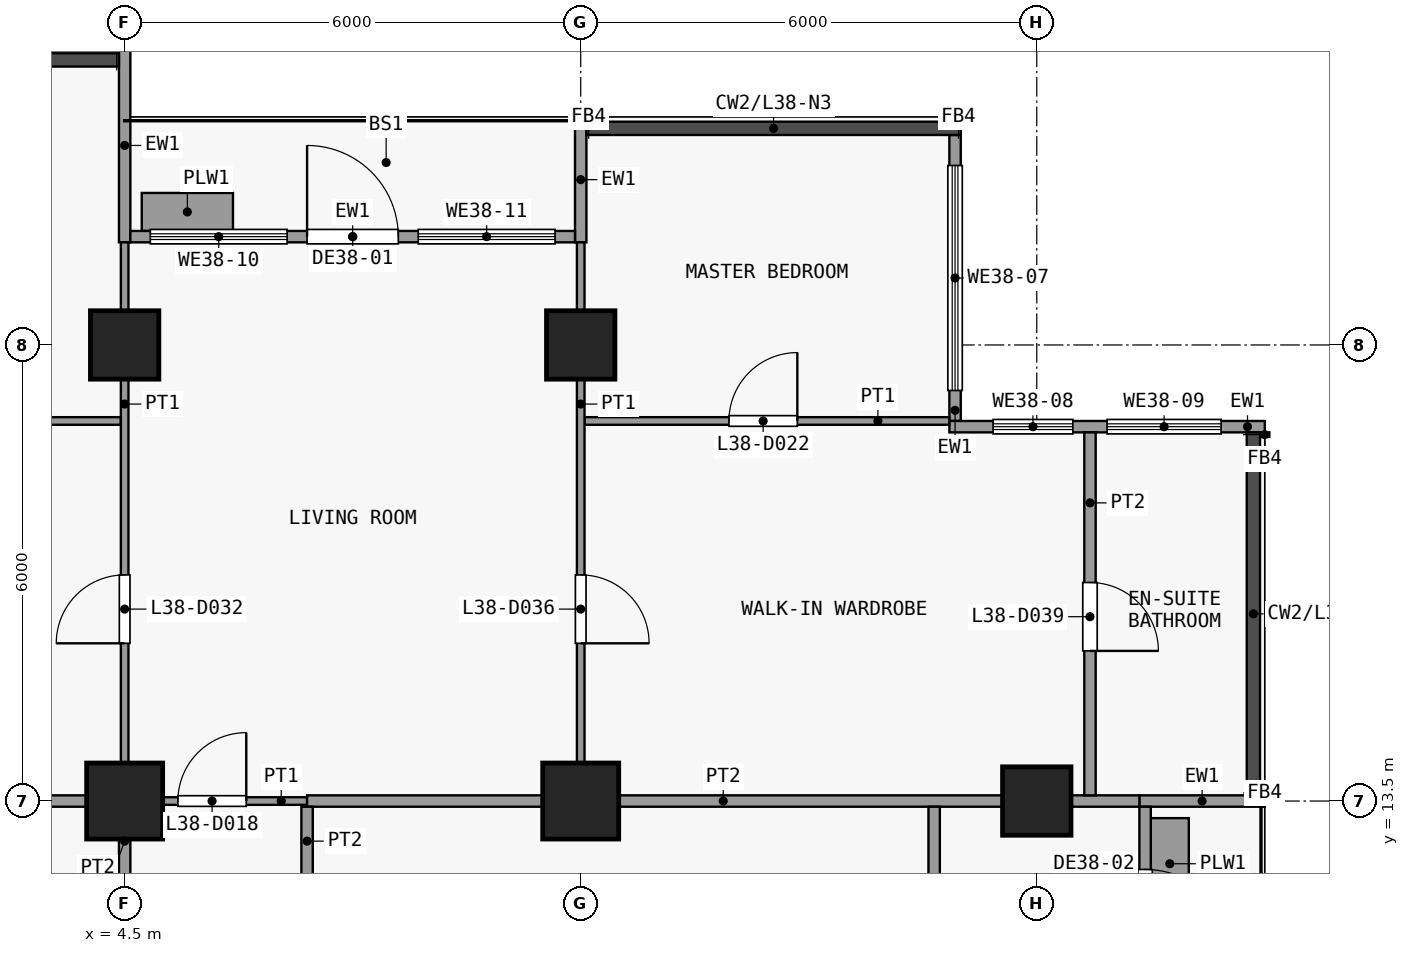
"""IFC4 building model, lengths in metres.
Left out: names, types, materials, properties, quantities, classifications, styles, units other than length and angle.
Written with IfcOpenShell. Run it as: python <this file> out.ifc"""

import sys

from ifc_helpers import new_model, si_unit, direction, frame, frame_2d, origin, origin_2d, place, context, subcontext, project, spatial, rectangle, extrude, element, fill, save


model = new_model("IFC4")
c1 = context("Model", 3, precision=1e-05, world=origin(), true_north=direction((0.0, 1.0)))
c2 = subcontext(c1, "Body", "Model", "MODEL_VIEW")
j1 = project(units=[si_unit("LENGTHUNIT", "METRE"), si_unit("PLANEANGLEUNIT", "RADIAN")], contexts=[c1])
p1 = place(None, origin())
s1 = spatial("IfcSite", under=j1, at=p1, CompositionType="ELEMENT")
p2 = place(p1, origin())
s2 = spatial("IfcBuilding", under=s1, at=p2, CompositionType="ELEMENT")
p3 = place(p2, frame((0.0, 0.0, 156.5)))
s3 = spatial("IfcBuildingStorey", under=s2, at=p3, CompositionType="ELEMENT", Elevation=156.5)
p4 = place(p3, frame((4.5, 13.5, 0.0), z_axis=(0.0, 0.0, 1.0), x_axis=(1.0, 0.0, 0.0)))
e1 = element("IfcColumn", 1, at=p4, inside=s3, PredefinedType="COLUMN", context=c2, shape_type="SweptSolid", body=[
    extrude(rectangle(XDim=1.0, YDim=1.0, at=origin_2d()), origin(), (0.0, 0.0, 1.0), 3.6),
])
p5 = place(p3, frame((4.5, 19.5, 0.0), z_axis=(0.0, 0.0, 1.0), x_axis=(1.0, 0.0, 0.0)))
e2 = element("IfcColumn", 2, at=p5, inside=s3, PredefinedType="COLUMN", context=c2, shape_type="SweptSolid", body=[
    extrude(rectangle(XDim=0.9, YDim=0.9, at=origin_2d()), origin(), (0.0, 0.0, 1.0), 3.6),
])
p6 = place(p3, frame((10.5, 13.5, 0.0), z_axis=(0.0, 0.0, 1.0), x_axis=(1.0, 0.0, 0.0)))
e3 = element("IfcColumn", 3, at=p6, inside=s3, PredefinedType="COLUMN", context=c2, shape_type="SweptSolid", body=[
    extrude(rectangle(XDim=1.0, YDim=1.0, at=origin_2d()), origin(), (0.0, 0.0, 1.0), 3.6),
])
for number, where, z_axis, x_axis in (
    (4, (10.5, 19.5, 0.0), (0.0, 0.0, 1.0), (1.0, 0.0, 0.0)),
    (5, (16.5, 13.5, 0.0), (0.0, 0.0, 1.0), (1.0, 0.0, 0.0)),
):
    element("IfcColumn", number, at=place(p3, frame(where, z_axis=z_axis, x_axis=x_axis)), inside=s3, PredefinedType="COLUMN", context=c2, shape_type="SweptSolid", body=[
        extrude(rectangle(XDim=0.9, YDim=0.9, at=origin_2d()), origin(), (0.0, 0.0, 1.0), 3.6),
    ])
p7 = place(p3, frame((15.425, 22.262, 0.0), z_axis=(0.0, 0.0, 1.0), x_axis=(0.0, -1.0, 0.0)))
e6 = element("IfcWall", 6, at=p7, inside=s3, PredefinedType="SOLIDWALL", context=c2, shape_type="SweptSolid", body=[
    extrude(rectangle(XDim=3.762, YDim=0.15, at=frame_2d((1.881, 0.0))), origin(), (0.0, 0.0, 1.0), 3.3),
])
p8 = place(p7, frame((0.401, 0.0, 0.9)))
e7 = element("IfcOpeningElement", 7, at=p8, cuts=e6, PredefinedType="OPENING", context=c2, shape_type="SweptSolid", body=[
    extrude(rectangle(XDim=2.96, YDim=2.4, at=frame_2d((1.48, 1.2))), frame((0.0, 0.085, 0.0), z_axis=(0.0, -1.0, 0.0), x_axis=(1.0, 0.0, 0.0)), (0.0, 0.0, 1.0), 0.17),
])
p9 = place(p3, frame((15.35, 18.425, 0.0), z_axis=(0.0, 0.0, 1.0), x_axis=(1.0, 0.0, 0.0)))
e8 = element("IfcWall", 8, at=p9, inside=s3, PredefinedType="SOLIDWALL", context=c2, shape_type="SweptSolid", body=[
    extrude(rectangle(XDim=4.15, YDim=0.15, at=frame_2d((2.075, 0.0))), origin(), (0.0, 0.0, 1.0), 3.3),
])
p10 = place(p9, frame((0.575, 0.0, 0.9)))
e9 = element("IfcOpeningElement", 9, at=p10, cuts=e8, PredefinedType="OPENING", context=c2, shape_type="SweptSolid", body=[
    extrude(rectangle(XDim=1.05, YDim=2.4, at=frame_2d((0.525, 1.2))), frame((0.0, 0.085, 0.0), z_axis=(0.0, -1.0, 0.0), x_axis=(1.0, 0.0, 0.0)), (0.0, 0.0, 1.0), 0.17),
])
p11 = place(p9, frame((2.075, 0.0, 0.9)))
e10 = element("IfcOpeningElement", 10, at=p11, cuts=e8, PredefinedType="OPENING", context=c2, shape_type="SweptSolid", body=[
    extrude(rectangle(XDim=1.5, YDim=2.4, at=frame_2d((0.75, 1.2))), frame((0.0, 0.085, 0.0), z_axis=(0.0, -1.0, 0.0), x_axis=(1.0, 0.0, 0.0)), (0.0, 0.0, 1.0), 0.17),
])
p12 = place(p3, frame((4.5, 20.85, 0.0), z_axis=(0.0, 0.0, 1.0), x_axis=(0.0, 1.0, 0.0)))
e11 = element("IfcWall", 11, at=p12, inside=s3, PredefinedType="SOLIDWALL", context=c2, shape_type="SweptSolid", body=[
    extrude(rectangle(XDim=2.55, YDim=0.15, at=frame_2d((1.275, 0.0))), origin(), (0.0, 0.0, 1.0), 3.3),
])
p13 = place(p3, frame((10.5, 20.85, 0.0), z_axis=(0.0, 0.0, 1.0), x_axis=(0.0, 1.0, 0.0)))
e12 = element("IfcWall", 12, at=p13, inside=s3, PredefinedType="SOLIDWALL", context=c2, shape_type="SweptSolid", body=[
    extrude(rectangle(XDim=1.65, YDim=0.15, at=frame_2d((0.825, 0.0))), origin(), (0.0, 0.0, 1.0), 3.3),
])
p14 = place(p3, frame((4.575, 20.925, 0.0), z_axis=(0.0, 0.0, 1.0), x_axis=(1.0, 0.0, 0.0)))
e13 = element("IfcWall", 13, at=p14, inside=s3, PredefinedType="SOLIDWALL", context=c2, shape_type="SweptSolid", body=[
    extrude(rectangle(XDim=5.85, YDim=0.15, at=frame_2d((2.925, 0.0))), origin(), (0.0, 0.0, 1.0), 3.3),
])
p15 = place(p14, frame((2.325, 0.0, 0.0)))
e14 = element("IfcOpeningElement", 14, at=p15, cuts=e13, PredefinedType="OPENING", context=c2, shape_type="SweptSolid", body=[
    extrude(rectangle(XDim=1.2, YDim=2.4, at=frame_2d((0.6, 1.2))), frame((0.0, 0.085, 0.0), z_axis=(0.0, -1.0, 0.0), x_axis=(1.0, 0.0, 0.0)), (0.0, 0.0, 1.0), 0.17),
])
p16 = place(p14, frame((0.262, 0.0, 0.9)))
e15 = element("IfcOpeningElement", 15, at=p16, cuts=e13, PredefinedType="OPENING", context=c2, shape_type="SweptSolid", body=[
    extrude(rectangle(XDim=1.8, YDim=2.1, at=frame_2d((0.9, 1.05))), frame((0.0, 0.085, 0.0), z_axis=(0.0, -1.0, 0.0), x_axis=(1.0, 0.0, 0.0)), (0.0, 0.0, 1.0), 0.17),
])
p17 = place(p14, frame((3.788, 0.0, 0.9)))
e16 = element("IfcOpeningElement", 16, at=p17, cuts=e13, PredefinedType="OPENING", context=c2, shape_type="SweptSolid", body=[
    extrude(rectangle(XDim=1.8, YDim=2.1, at=frame_2d((0.9, 1.05))), frame((0.0, 0.085, 0.0), z_axis=(0.0, -1.0, 0.0), x_axis=(1.0, 0.0, 0.0)), (0.0, 0.0, 1.0), 0.17),
])
p18 = place(p3, frame((4.725, 21.25, 0.0), z_axis=(0.0, 0.0, 1.0), x_axis=(1.0, 0.0, 0.0)))
e17 = element("IfcWall", 17, at=p18, inside=s3, PredefinedType="USERDEFINED", context=c2, shape_type="SweptSolid", body=[
    extrude(rectangle(XDim=1.2, YDim=0.5, at=frame_2d((0.6, 0.0))), origin(), (0.0, 0.0, 1.0), 0.9),
])
p19 = place(p3, frame((17.85, 13.5, 0.0), z_axis=(0.0, 0.0, 1.0), x_axis=(1.0, 0.0, 0.0)))
e18 = element("IfcWall", 18, at=p19, inside=s3, PredefinedType="SOLIDWALL", context=c2, shape_type="SweptSolid", body=[
    extrude(rectangle(XDim=1.65, YDim=0.15, at=frame_2d((0.825, 0.0))), origin(), (0.0, 0.0, 1.0), 3.3),
])
p20 = place(p3, frame((17.925, 13.425, 0.0), z_axis=(0.0, 0.0, 1.0), x_axis=(0.0, -1.0, 0.0)))
e19 = element("IfcWall", 19, at=p20, inside=s3, PredefinedType="SOLIDWALL", context=c2, shape_type="SweptSolid", body=[
    extrude(rectangle(XDim=5.85, YDim=0.15, at=frame_2d((2.925, 0.0))), origin(), (0.0, 0.0, 1.0), 3.3),
])
p21 = place(p20, frame((0.825, 0.0, 0.0)))
e20 = element("IfcOpeningElement", 20, at=p21, cuts=e19, PredefinedType="OPENING", context=c2, shape_type="SweptSolid", body=[
    extrude(rectangle(XDim=1.2, YDim=2.4, at=frame_2d((0.6, 1.2))), frame((0.0, 0.085, 0.0), z_axis=(0.0, -1.0, 0.0), x_axis=(1.0, 0.0, 0.0)), (0.0, 0.0, 1.0), 0.17),
])
p22 = place(p20, frame((3.038, 0.0, 0.9)))
e21 = element("IfcOpeningElement", 21, at=p22, cuts=e19, PredefinedType="OPENING", context=c2, shape_type="SweptSolid", body=[
    extrude(rectangle(XDim=1.8, YDim=2.1, at=frame_2d((0.9, 1.05))), frame((0.0, 0.085, 0.0), z_axis=(0.0, -1.0, 0.0), x_axis=(1.0, 0.0, 0.0)), (0.0, 0.0, 1.0), 0.17),
])
p23 = place(p3, frame((18.25, 12.075, 0.0), z_axis=(0.0, 0.0, 1.0), x_axis=(0.0, 1.0, 0.0)))
e22 = element("IfcWall", 22, at=p23, inside=s3, PredefinedType="USERDEFINED", context=c2, shape_type="SweptSolid", body=[
    extrude(rectangle(XDim=1.2, YDim=0.5, at=frame_2d((0.6, 0.0))), origin(), (0.0, 0.0, 1.0), 0.9),
])
p24 = place(p3, frame((4.5, 13.5, 0.0), z_axis=(0.0, 0.0, 1.0), x_axis=(1.0, 0.0, 0.0)))
e23 = element("IfcWall", 23, at=p24, inside=s3, PredefinedType="PARTITIONING", context=c2, shape_type="SweptSolid", body=[
    extrude(rectangle(XDim=2.4, YDim=0.1, at=frame_2d((1.2, 0.0))), origin(), (0.0, 0.0, 1.0), 3.3),
])
p25 = place(p24, frame((0.7, 0.0, 0.0)))
e24 = element("IfcOpeningElement", 24, at=p25, cuts=e23, PredefinedType="OPENING", context=c2, shape_type="SweptSolid", body=[
    extrude(rectangle(XDim=0.9, YDim=2.1, at=frame_2d((0.45, 1.05))), frame((0.0, 0.06, 0.0), z_axis=(0.0, -1.0, 0.0), x_axis=(1.0, 0.0, 0.0)), (0.0, 0.0, 1.0), 0.12),
])
p26 = place(p3, frame((0.0, 13.5, 0.0), z_axis=(0.0, 0.0, 1.0), x_axis=(1.0, 0.0, 0.0)))
e25 = element("IfcWall", 25, at=p26, inside=s3, PredefinedType="PARTITIONING", context=c2, shape_type="SweptSolid", body=[
    extrude(rectangle(XDim=4.5, YDim=0.15, at=frame_2d((2.25, 0.0))), origin(), (0.0, 0.0, 1.0), 3.3),
])
p27 = place(p3, frame((6.9, 13.5, 0.0), z_axis=(0.0, 0.0, 1.0), x_axis=(1.0, 0.0, 0.0)))
e26 = element("IfcWall", 26, at=p27, inside=s3, PredefinedType="PARTITIONING", context=c2, shape_type="SweptSolid", body=[
    extrude(rectangle(XDim=10.95, YDim=0.15, at=frame_2d((5.475, 0.0))), origin(), (0.0, 0.0, 1.0), 3.3),
])
p28 = place(p3, frame((-4.4, 18.5, 0.0), z_axis=(0.0, 0.0, 1.0), x_axis=(1.0, 0.0, 0.0)))
e27 = element("IfcWall", 27, at=p28, inside=s3, PredefinedType="PARTITIONING", context=c2, shape_type="SweptSolid", body=[
    extrude(rectangle(XDim=8.85, YDim=0.1, at=frame_2d((4.425, 0.0))), origin(), (0.0, 0.0, 1.0), 3.3),
])
p29 = place(p28, frame((4.0, 0.0, 0.0)))
e28 = element("IfcOpeningElement", 28, at=p29, cuts=e27, PredefinedType="OPENING", context=c2, shape_type="SweptSolid", body=[
    extrude(rectangle(XDim=0.9, YDim=2.1, at=frame_2d((0.45, 1.05))), frame((0.0, 0.06, 0.0), z_axis=(0.0, -1.0, 0.0), x_axis=(1.0, 0.0, 0.0)), (0.0, 0.0, 1.0), 0.12),
])
p30 = place(p3, frame((10.55, 18.5, 0.0), z_axis=(0.0, 0.0, 1.0), x_axis=(1.0, 0.0, 0.0)))
e29 = element("IfcWall", 29, at=p30, inside=s3, PredefinedType="PARTITIONING", context=c2, shape_type="SweptSolid", body=[
    extrude(rectangle(XDim=4.8, YDim=0.1, at=frame_2d((2.4, 0.0))), origin(), (0.0, 0.0, 1.0), 3.3),
])
p31 = place(p30, frame((1.9, 0.0, 0.0)))
e30 = element("IfcOpeningElement", 30, at=p31, cuts=e29, PredefinedType="OPENING", context=c2, shape_type="SweptSolid", body=[
    extrude(rectangle(XDim=0.9, YDim=2.1, at=frame_2d((0.45, 1.05))), frame((0.0, 0.06, 0.0), z_axis=(0.0, -1.0, 0.0), x_axis=(1.0, 0.0, 0.0)), (0.0, 0.0, 1.0), 0.12),
])
p32 = place(p3, frame((4.5, 13.575, 0.0), z_axis=(0.0, 0.0, 1.0), x_axis=(0.0, 1.0, 0.0)))
e31 = element("IfcWall", 31, at=p32, inside=s3, PredefinedType="PARTITIONING", context=c2, shape_type="SweptSolid", body=[
    extrude(rectangle(XDim=7.275, YDim=0.1, at=frame_2d((3.638, 0.0))), origin(), (0.0, 0.0, 1.0), 3.3),
])
p33 = place(p32, frame((2.0, 0.0, 0.0)))
e32 = element("IfcOpeningElement", 32, at=p33, cuts=e31, PredefinedType="OPENING", context=c2, shape_type="SweptSolid", body=[
    extrude(rectangle(XDim=0.9, YDim=2.1, at=frame_2d((0.45, 1.05))), frame((0.0, 0.06, 0.0), z_axis=(0.0, -1.0, 0.0), x_axis=(1.0, 0.0, 0.0)), (0.0, 0.0, 1.0), 0.12),
])
p34 = place(p3, frame((4.5, 10.6, 0.0), z_axis=(0.0, 0.0, 1.0), x_axis=(0.0, 1.0, 0.0)))
e33 = element("IfcWall", 33, at=p34, inside=s3, PredefinedType="PARTITIONING", context=c2, shape_type="SweptSolid", body=[
    extrude(rectangle(XDim=2.825, YDim=0.15, at=frame_2d((1.413, 0.0))), origin(), (0.0, 0.0, 1.0), 3.3),
])
p35 = place(p34, frame((0.9, 0.0, 0.0)))
e34 = element("IfcOpeningElement", 34, at=p35, cuts=e33, PredefinedType="OPENING", context=c2, shape_type="SweptSolid", body=[
    extrude(rectangle(XDim=0.9, YDim=2.1, at=frame_2d((0.45, 1.05))), frame((0.0, 0.085, 0.0), z_axis=(0.0, -1.0, 0.0), x_axis=(1.0, 0.0, 0.0)), (0.0, 0.0, 1.0), 0.17),
])
p36 = place(p3, frame((6.9, 10.6, 0.0), z_axis=(0.0, 0.0, 1.0), x_axis=(0.0, 1.0, 0.0)))
e35 = element("IfcWall", 35, at=p36, inside=s3, PredefinedType="PARTITIONING", context=c2, shape_type="SweptSolid", body=[
    extrude(rectangle(XDim=2.825, YDim=0.15, at=frame_2d((1.413, 0.0))), origin(), (0.0, 0.0, 1.0), 3.3),
])
p37 = place(p36, frame((0.9, 0.0, 0.0)))
e36 = element("IfcOpeningElement", 36, at=p37, cuts=e35, PredefinedType="OPENING", context=c2, shape_type="SweptSolid", body=[
    extrude(rectangle(XDim=0.9, YDim=2.1, at=frame_2d((0.45, 1.05))), frame((0.0, 0.085, 0.0), z_axis=(0.0, -1.0, 0.0), x_axis=(1.0, 0.0, 0.0)), (0.0, 0.0, 1.0), 0.17),
])
p38 = place(p3, frame((10.5, 13.575, 0.0), z_axis=(0.0, 0.0, 1.0), x_axis=(0.0, 1.0, 0.0)))
e37 = element("IfcWall", 37, at=p38, inside=s3, PredefinedType="PARTITIONING", context=c2, shape_type="SweptSolid", body=[
    extrude(rectangle(XDim=7.275, YDim=0.1, at=frame_2d((3.638, 0.0))), origin(), (0.0, 0.0, 1.0), 3.3),
])
p39 = place(p38, frame((2.0, 0.0, 0.0)))
e38 = element("IfcOpeningElement", 38, at=p39, cuts=e37, PredefinedType="OPENING", context=c2, shape_type="SweptSolid", body=[
    extrude(rectangle(XDim=0.9, YDim=2.1, at=frame_2d((0.45, 1.05))), frame((0.0, 0.06, 0.0), z_axis=(0.0, -1.0, 0.0), x_axis=(1.0, 0.0, 0.0)), (0.0, 0.0, 1.0), 0.12),
])
p40 = place(p3, frame((15.15, 10.6, 0.0), z_axis=(0.0, 0.0, 1.0), x_axis=(0.0, 1.0, 0.0)))
e39 = element("IfcWall", 39, at=p40, inside=s3, PredefinedType="PARTITIONING", context=c2, shape_type="SweptSolid", body=[
    extrude(rectangle(XDim=2.825, YDim=0.15, at=frame_2d((1.413, 0.0))), origin(), (0.0, 0.0, 1.0), 3.3),
])
p41 = place(p40, frame((1.0, 0.0, 0.0)))
e40 = element("IfcOpeningElement", 40, at=p41, cuts=e39, PredefinedType="OPENING", context=c2, shape_type="SweptSolid", body=[
    extrude(rectangle(XDim=0.9, YDim=2.1, at=frame_2d((0.45, 1.05))), frame((0.0, 0.085, 0.0), z_axis=(0.0, -1.0, 0.0), x_axis=(1.0, 0.0, 0.0)), (0.0, 0.0, 1.0), 0.17),
])
p42 = place(p3, frame((17.2, 13.575, 0.0), z_axis=(0.0, 0.0, 1.0), x_axis=(0.0, 1.0, 0.0)))
e41 = element("IfcWall", 41, at=p42, inside=s3, PredefinedType="PARTITIONING", context=c2, shape_type="SweptSolid", body=[
    extrude(rectangle(XDim=4.775, YDim=0.15, at=frame_2d((2.388, 0.0))), origin(), (0.0, 0.0, 1.0), 3.3),
])
p43 = place(p42, frame((1.9, 0.0, 0.0)))
e42 = element("IfcOpeningElement", 42, at=p43, cuts=e41, PredefinedType="OPENING", context=c2, shape_type="SweptSolid", body=[
    extrude(rectangle(XDim=0.9, YDim=2.1, at=frame_2d((0.45, 1.05))), frame((0.0, 0.085, 0.0), z_axis=(0.0, -1.0, 0.0), x_axis=(1.0, 0.0, 0.0)), (0.0, 0.0, 1.0), 0.17),
])
p44 = place(p8, origin())
e43 = element("IfcWindow", 43, at=p44, inside=s3, PartitioningType="SINGLE_PANEL", PredefinedType="WINDOW", context=c2, shape_type="SweptSolid", body=[
    extrude(rectangle(XDim=2.96, YDim=2.4, at=frame_2d((1.48, 1.2))), frame((0.0, 0.03, 0.0), z_axis=(0.0, -1.0, 0.0), x_axis=(1.0, 0.0, 0.0)), (0.0, 0.0, 1.0), 0.06),
])
fill(e7, e43)
p45 = place(p10, origin())
e44 = element("IfcWindow", 44, at=p45, inside=s3, PartitioningType="SINGLE_PANEL", PredefinedType="WINDOW", context=c2, shape_type="SweptSolid", body=[
    extrude(rectangle(XDim=1.05, YDim=2.4, at=frame_2d((0.525, 1.2))), frame((0.0, 0.03, 0.0), z_axis=(0.0, -1.0, 0.0), x_axis=(1.0, 0.0, 0.0)), (0.0, 0.0, 1.0), 0.06),
])
fill(e9, e44)
p46 = place(p11, origin())
e45 = element("IfcWindow", 45, at=p46, inside=s3, PartitioningType="SINGLE_PANEL", PredefinedType="WINDOW", context=c2, shape_type="SweptSolid", body=[
    extrude(rectangle(XDim=1.5, YDim=2.4, at=frame_2d((0.75, 1.2))), frame((0.0, 0.03, 0.0), z_axis=(0.0, -1.0, 0.0), x_axis=(1.0, 0.0, 0.0)), (0.0, 0.0, 1.0), 0.06),
])
fill(e10, e45)
p47 = place(p15, origin())
e46 = element("IfcDoor", 46, at=p47, inside=s3, OperationType="SINGLE_SWING_LEFT", PredefinedType="DOOR", context=c2, shape_type="SweptSolid", body=[
    extrude(rectangle(XDim=1.2, YDim=2.4, at=frame_2d((0.6, 1.2))), frame((0.0, 0.025, 0.0), z_axis=(0.0, -1.0, 0.0), x_axis=(1.0, 0.0, 0.0)), (0.0, 0.0, 1.0), 0.05),
])
fill(e14, e46)
p48 = place(p16, origin())
e47 = element("IfcWindow", 47, at=p48, inside=s3, PartitioningType="SINGLE_PANEL", PredefinedType="WINDOW", context=c2, shape_type="SweptSolid", body=[
    extrude(rectangle(XDim=1.8, YDim=2.1, at=frame_2d((0.9, 1.05))), frame((0.0, 0.03, 0.0), z_axis=(0.0, -1.0, 0.0), x_axis=(1.0, 0.0, 0.0)), (0.0, 0.0, 1.0), 0.06),
])
fill(e15, e47)
p49 = place(p17, origin())
e48 = element("IfcWindow", 48, at=p49, inside=s3, PartitioningType="SINGLE_PANEL", PredefinedType="WINDOW", context=c2, shape_type="SweptSolid", body=[
    extrude(rectangle(XDim=1.8, YDim=2.1, at=frame_2d((0.9, 1.05))), frame((0.0, 0.03, 0.0), z_axis=(0.0, -1.0, 0.0), x_axis=(1.0, 0.0, 0.0)), (0.0, 0.0, 1.0), 0.06),
])
fill(e16, e48)
p50 = place(p21, origin())
e49 = element("IfcDoor", 49, at=p50, inside=s3, OperationType="SINGLE_SWING_RIGHT", PredefinedType="DOOR", context=c2, shape_type="SweptSolid", body=[
    extrude(rectangle(XDim=1.2, YDim=2.4, at=frame_2d((0.6, 1.2))), frame((0.0, 0.025, 0.0), z_axis=(0.0, -1.0, 0.0), x_axis=(1.0, 0.0, 0.0)), (0.0, 0.0, 1.0), 0.05),
])
fill(e20, e49)
p51 = place(p25, origin())
e50 = element("IfcDoor", 50, at=p51, inside=s3, OperationType="SINGLE_SWING_LEFT", PredefinedType="DOOR", context=c2, shape_type="SweptSolid", body=[
    extrude(rectangle(XDim=0.9, YDim=2.1, at=frame_2d((0.45, 1.05))), frame((0.0, 0.025, 0.0), z_axis=(0.0, -1.0, 0.0), x_axis=(1.0, 0.0, 0.0)), (0.0, 0.0, 1.0), 0.05),
])
fill(e24, e50)
p52 = place(p31, origin())
e51 = element("IfcDoor", 51, at=p52, inside=s3, OperationType="SINGLE_SWING_LEFT", PredefinedType="DOOR", context=c2, shape_type="SweptSolid", body=[
    extrude(rectangle(XDim=0.9, YDim=2.1, at=frame_2d((0.45, 1.05))), frame((0.0, 0.025, 0.0), z_axis=(0.0, -1.0, 0.0), x_axis=(1.0, 0.0, 0.0)), (0.0, 0.0, 1.0), 0.05),
])
fill(e30, e51)
p53 = place(p33, origin())
e52 = element("IfcDoor", 52, at=p53, inside=s3, OperationType="SINGLE_SWING_RIGHT", PredefinedType="DOOR", context=c2, shape_type="SweptSolid", body=[
    extrude(rectangle(XDim=0.9, YDim=2.1, at=frame_2d((0.45, 1.05))), frame((0.0, 0.025, 0.0), z_axis=(0.0, -1.0, 0.0), x_axis=(1.0, 0.0, 0.0)), (0.0, 0.0, 1.0), 0.05),
])
fill(e32, e52)
p54 = place(p39, origin())
e53 = element("IfcDoor", 53, at=p54, inside=s3, OperationType="SINGLE_SWING_LEFT", PredefinedType="DOOR", context=c2, shape_type="SweptSolid", body=[
    extrude(rectangle(XDim=0.9, YDim=2.1, at=frame_2d((0.45, 1.05))), frame((0.0, 0.025, 0.0), z_axis=(0.0, -1.0, 0.0), x_axis=(1.0, 0.0, 0.0)), (0.0, 0.0, 1.0), 0.05),
])
fill(e38, e53)
p55 = place(p43, origin())
e54 = element("IfcDoor", 54, at=p55, inside=s3, OperationType="SINGLE_SWING_LEFT", PredefinedType="DOOR", context=c2, shape_type="SweptSolid", body=[
    extrude(rectangle(XDim=0.9, YDim=2.1, at=frame_2d((0.45, 1.05))), frame((0.0, 0.025, 0.0), z_axis=(0.0, -1.0, 0.0), x_axis=(1.0, 0.0, 0.0)), (0.0, 0.0, 1.0), 0.05),
])
fill(e42, e54)
save(model, sys.argv[1])
